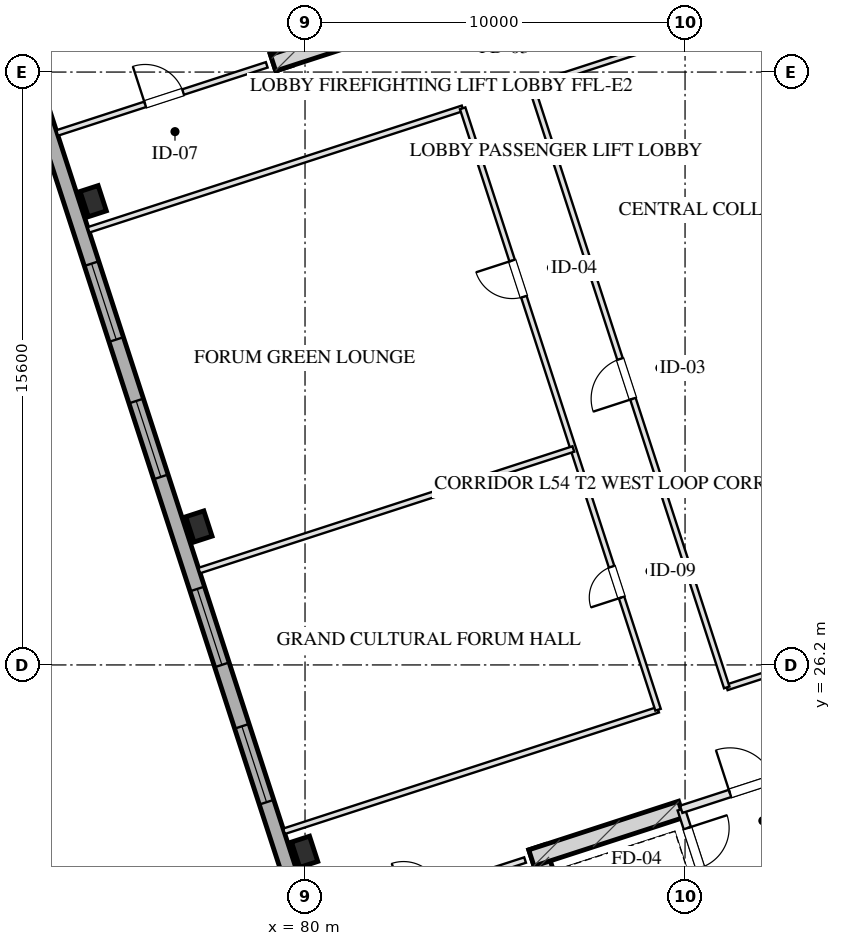
"""IFC4 building model, lengths in metres.
Left out: names, types, materials, properties, quantities, classifications, styles, units other than length and angle.
Written with IfcOpenShell. Run it as: python <this file> out.ifc"""

import sys

from ifc_helpers import new_model, si_unit, direction, frame, frame_2d, origin, origin_2d, place, context, subcontext, project, spatial, rectangle, hollow_rectangle, extrude, element, fill, save


model = new_model("IFC4")
c1 = context("Model", 3, precision=1e-05, world=origin(), true_north=direction((0.0, 1.0)))
c2 = subcontext(c1, "Body", "Model", "MODEL_VIEW")
j1 = project(units=[si_unit("LENGTHUNIT", "METRE"), si_unit("PLANEANGLEUNIT", "RADIAN")], contexts=[c1])
p1 = place(None, origin())
s1 = spatial("IfcSite", under=j1, at=p1, CompositionType="ELEMENT")
p2 = place(p1, origin())
s2 = spatial("IfcBuilding", under=s1, at=p2, CompositionType="ELEMENT")
p3 = place(p2, frame((0.0, 0.0, 202.4)))
s3 = spatial("IfcBuildingStorey", under=s2, at=p3, CompositionType="ELEMENT", Elevation=202.4)
p4 = place(p3, frame((86.102, 21.404, 0.0), z_axis=(0.0, 0.0, 1.0), x_axis=(0.309035778627, -0.951050412717, 0.0)))
e1 = element("IfcWall", 1, at=p4, inside=s3, PredefinedType="SHEAR", context=c2, shape_type="SweptSolid", body=[
    extrude(rectangle(XDim=9.33, YDim=0.45, at=frame_2d((4.665, 0.0))), origin(), (0.0, 0.0, 1.0), 3.45),
])
p5 = place(p3, frame((85.957, 21.12, 0.0), z_axis=(0.0, 0.0, 1.0), x_axis=(0.951064796122, 0.308991510526, 0.0)))
e2 = element("IfcWall", 2, at=p5, inside=s3, PredefinedType="SHEAR", context=c2, shape_type="SweptSolid", body=[
    extrude(rectangle(XDim=4.145, YDim=0.45, at=frame_2d((2.073, 0.0))), origin(), (0.0, 0.0, 1.0), 3.45),
])
p6 = place(p3, frame((79.442, 41.899, 0.0), z_axis=(0.0, 0.0, 1.0), x_axis=(-0.309035778627, 0.951050412717, 0.0)))
e3 = element("IfcWall", 3, at=p6, inside=s3, PredefinedType="SHEAR", context=c2, shape_type="SweptSolid", body=[
    extrude(rectangle(XDim=9.33, YDim=0.45, at=frame_2d((4.665, 0.0))), origin(), (0.0, 0.0, 1.0), 3.45),
])
p7 = place(p3, frame((79.159, 42.043, 0.0), z_axis=(0.0, 0.0, 1.0), x_axis=(0.951047485828, 0.309044785913, 0.0)))
e4 = element("IfcWall", 4, at=p7, inside=s3, PredefinedType="SHEAR", context=c2, shape_type="SweptSolid", body=[
    extrude(rectangle(XDim=4.145, YDim=0.45, at=frame_2d((2.073, 0.0))), origin(), (0.0, 0.0, 1.0), 3.45),
])
for number, where, z_axis, x_axis in (
    (5, (79.99, 21.284, 0.0), (0.0, 0.0, 1.0), (0.951, 0.309, 0.0)),
    (6, (77.208, 29.844, 0.0), (0.0, 0.0, 1.0), (0.951, 0.309, 0.0)),
    (7, (74.427, 38.403, 0.0), (0.0, 0.0, 1.0), (0.951, 0.309, 0.0)),
):
    element("IfcColumn", number, at=place(p3, frame(where, z_axis=z_axis, x_axis=x_axis)), inside=s3, PredefinedType="COLUMN", context=c2, shape_type="SweptSolid", body=[
        extrude(hollow_rectangle(XDim=0.5, YDim=0.7, WallThickness=0.025, at=origin_2d()), origin(), (0.0, 0.0, 1.0), 3.451),
    ])
p8 = place(p3, frame((82.618, 11.414, 0.0), z_axis=(0.0, 0.0, 1.0), x_axis=(-0.309016491071, 0.951056679828, 0.0)))
e8 = element("IfcWall", 8, at=p8, inside=s3, PredefinedType="SOLIDWALL", context=c2, shape_type="SweptSolid", body=[
    extrude(rectangle(XDim=38.4, YDim=0.4, at=frame_2d((19.2, 0.0))), origin(), (0.0, 0.0, 1.0), 2.61),
])
p9 = place(p8, frame((11.75, 0.0, 0.75)))
e9 = element("IfcOpeningElement", 9, at=p9, cuts=e8, PredefinedType="OPENING", context=c2, shape_type="SweptSolid", body=[
    extrude(rectangle(XDim=2.1, YDim=1.46, at=frame_2d((1.05, 0.73))), frame((0.0, 0.21, 0.0), z_axis=(0.0, -1.0, 0.0), x_axis=(1.0, 0.0, 0.0)), (0.0, 0.0, 1.0), 0.42),
])
p10 = place(p8, frame((15.55, 0.0, 0.75)))
e10 = element("IfcOpeningElement", 10, at=p10, cuts=e8, PredefinedType="OPENING", context=c2, shape_type="SweptSolid", body=[
    extrude(rectangle(XDim=2.1, YDim=1.46, at=frame_2d((1.05, 0.73))), frame((0.0, 0.21, 0.0), z_axis=(0.0, -1.0, 0.0), x_axis=(1.0, 0.0, 0.0)), (0.0, 0.0, 1.0), 0.42),
])
p11 = place(p8, frame((20.75, 0.0, 0.75)))
e11 = element("IfcOpeningElement", 11, at=p11, cuts=e8, PredefinedType="OPENING", context=c2, shape_type="SweptSolid", body=[
    extrude(rectangle(XDim=2.1, YDim=1.46, at=frame_2d((1.05, 0.73))), frame((0.0, 0.21, 0.0), z_axis=(0.0, -1.0, 0.0), x_axis=(1.0, 0.0, 0.0)), (0.0, 0.0, 1.0), 0.42),
])
p12 = place(p8, frame((24.55, 0.0, 0.75)))
e12 = element("IfcOpeningElement", 12, at=p12, cuts=e8, PredefinedType="OPENING", context=c2, shape_type="SweptSolid", body=[
    extrude(rectangle(XDim=2.1, YDim=1.46, at=frame_2d((1.05, 0.73))), frame((0.0, 0.21, 0.0), z_axis=(0.0, -1.0, 0.0), x_axis=(1.0, 0.0, 0.0)), (0.0, 0.0, 1.0), 0.42),
])
p13 = place(p3, frame((89.899, 22.401, 0.0), z_axis=(0.0, 0.0, 1.0), x_axis=(0.308932062672, -0.951084108086, 0.0)))
e13 = element("IfcWall", 13, at=p13, inside=s3, PredefinedType="PARTITIONING", context=c2, shape_type="SweptSolid", body=[
    extrude(rectangle(XDim=1.9, YDim=0.2, at=frame_2d((0.95, 0.0))), origin(), (0.0, 0.0, 1.0), 3.175),
])
p14 = place(p13, frame((0.52, 0.0, 0.0)))
e14 = element("IfcOpeningElement", 14, at=p14, cuts=e13, PredefinedType="OPENING", context=c2, shape_type="SweptSolid", body=[
    extrude(rectangle(XDim=1.1, YDim=2.05, at=frame_2d((0.55, 1.025))), frame((0.0, 0.11, 0.0), z_axis=(0.0, -1.0, 0.0), x_axis=(1.0, 0.0, 0.0)), (0.0, 0.0, 1.0), 0.22),
])
p15 = place(p3, frame((89.899, 22.401, 0.0), z_axis=(0.0, 0.0, 1.0), x_axis=(0.951046716504, 0.309047153403, 0.0)))
e15 = element("IfcWall", 15, at=p15, inside=s3, PredefinedType="PARTITIONING", context=c2, shape_type="SweptSolid", body=[
    extrude(rectangle(XDim=3.83, YDim=0.2, at=frame_2d((1.915, 0.0))), origin(), (0.0, 0.0, 1.0), 3.175),
])
p16 = place(p15, frame((1.35, 0.0, 0.0)))
e16 = element("IfcOpeningElement", 16, at=p16, cuts=e15, PredefinedType="OPENING", context=c2, shape_type="SweptSolid", body=[
    extrude(rectangle(XDim=1.2, YDim=2.05, at=frame_2d((0.6, 1.025))), frame((0.0, 0.11, 0.0), z_axis=(0.0, -1.0, 0.0), x_axis=(1.0, 0.0, 0.0)), (0.0, 0.0, 1.0), 0.22),
])
p17 = place(p3, frame((80.275, 19.274, 0.0), z_axis=(0.0, 0.0, 1.0), x_axis=(0.951059431056, 0.309008023519, 0.0)))
e17 = element("IfcWall", 17, at=p17, inside=s3, PredefinedType="PARTITIONING", context=c2, shape_type="SweptSolid", body=[
    extrude(rectangle(XDim=5.8, YDim=0.15, at=frame_2d((2.9, 0.0))), origin(), (0.0, 0.0, 1.0), 3.175),
])
p18 = place(p17, frame((2.436, 0.0, 0.0)))
e18 = element("IfcOpeningElement", 18, at=p18, cuts=e17, PredefinedType="OPENING", context=c2, shape_type="SweptSolid", body=[
    extrude(rectangle(XDim=1.0, YDim=2.05, at=frame_2d((0.5, 1.025))), frame((0.0, 0.085, 0.0), z_axis=(0.0, -1.0, 0.0), x_axis=(1.0, 0.0, 0.0)), (0.0, 0.0, 1.0), 0.17),
])
p19 = place(p3, frame((73.476, 40.197, 0.0), z_axis=(0.0, 0.0, 1.0), x_axis=(0.951059431056, 0.309008023519, 0.0)))
e19 = element("IfcWall", 19, at=p19, inside=s3, PredefinedType="PARTITIONING", context=c2, shape_type="SweptSolid", body=[
    extrude(rectangle(XDim=5.8, YDim=0.15, at=frame_2d((2.9, 0.0))), origin(), (0.0, 0.0, 1.0), 3.175),
])
p20 = place(p19, frame((2.436, 0.0, 0.0)))
e20 = element("IfcOpeningElement", 20, at=p20, cuts=e19, PredefinedType="OPENING", context=c2, shape_type="SweptSolid", body=[
    extrude(rectangle(XDim=1.05, YDim=2.05, at=frame_2d((0.525, 1.025))), frame((0.0, 0.085, 0.0), z_axis=(0.0, -1.0, 0.0), x_axis=(1.0, 0.0, 0.0)), (0.0, 0.0, 1.0), 0.17),
])
p21 = place(p3, frame((79.447, 21.823, 0.0), z_axis=(0.0, 0.0, 1.0), x_axis=(0.951057294912, 0.309014598029, 0.0)))
e21 = element("IfcWall", 21, at=p21, inside=s3, PredefinedType="PARTITIONING", context=c2, shape_type="SweptSolid", body=[
    extrude(rectangle(XDim=10.35, YDim=0.15, at=frame_2d((5.175, 0.0))), origin(), (0.0, 0.0, 1.0), 3.175),
])
p22 = place(p3, frame((91.097, 25.608, 0.0), z_axis=(0.0, 0.0, 1.0), x_axis=(0.951053063704, 0.309027620156, 0.0)))
e22 = element("IfcWall", 22, at=p22, inside=s3, PredefinedType="PARTITIONING", context=c2, shape_type="SweptSolid", body=[
    extrude(rectangle(XDim=9.35, YDim=0.15, at=frame_2d((4.675, 0.0))), origin(), (0.0, 0.0, 1.0), 3.175),
])
p23 = place(p3, frame((74.304, 37.648, 0.0), z_axis=(0.0, 0.0, 1.0), x_axis=(0.951059547341, 0.309007665621, 0.0)))
e23 = element("IfcWall", 23, at=p23, inside=s3, PredefinedType="PARTITIONING", context=c2, shape_type="SweptSolid", body=[
    extrude(rectangle(XDim=10.35, YDim=0.15, at=frame_2d((5.175, 0.0))), origin(), (0.0, 0.0, 1.0), 3.175),
])
p24 = place(p3, frame((85.955, 41.434, 0.0), z_axis=(0.0, 0.0, 1.0), x_axis=(0.951053063704, 0.309027620156, 0.0)))
e24 = element("IfcWall", 24, at=p24, inside=s3, PredefinedType="PARTITIONING", context=c2, shape_type="SweptSolid", body=[
    extrude(rectangle(XDim=9.35, YDim=0.15, at=frame_2d((4.675, 0.0))), origin(), (0.0, 0.0, 1.0), 3.175),
])
p25 = place(p3, frame((89.29, 25.021, 0.0), z_axis=(0.0, 0.0, 1.0), x_axis=(-0.309004459387, 0.951060589068, 0.0)))
e25 = element("IfcWall", 25, at=p25, inside=s3, PredefinedType="PARTITIONING", context=c2, shape_type="SweptSolid", body=[
    extrude(rectangle(XDim=16.64, YDim=0.15, at=frame_2d((8.32, 0.0))), origin(), (0.0, 0.0, 1.0), 3.175),
])
p26 = place(p25, frame((3.107, 0.0, 0.0)))
e26 = element("IfcOpeningElement", 26, at=p26, cuts=e25, PredefinedType="OPENING", context=c2, shape_type="SweptSolid", body=[
    extrude(rectangle(XDim=0.85, YDim=2.05, at=frame_2d((0.425, 1.025))), frame((0.0, 0.085, 0.0), z_axis=(0.0, -1.0, 0.0), x_axis=(1.0, 0.0, 0.0)), (0.0, 0.0, 1.0), 0.17),
])
p27 = place(p25, frame((11.427, 0.0, 0.0)))
e27 = element("IfcOpeningElement", 27, at=p27, cuts=e25, PredefinedType="OPENING", context=c2, shape_type="SweptSolid", body=[
    extrude(rectangle(XDim=1.0, YDim=2.05, at=frame_2d((0.5, 1.025))), frame((0.0, 0.085, 0.0), z_axis=(0.0, -1.0, 0.0), x_axis=(1.0, 0.0, 0.0)), (0.0, 0.0, 1.0), 0.17),
])
p28 = place(p3, frame((91.097, 25.608, 0.0), z_axis=(0.0, 0.0, 1.0), x_axis=(-0.30901773025, 0.951056277195, 0.0)))
e28 = element("IfcWall", 28, at=p28, inside=s3, PredefinedType="PARTITIONING", context=c2, shape_type="SweptSolid", body=[
    extrude(rectangle(XDim=16.64, YDim=0.15, at=frame_2d((8.32, 0.0))), origin(), (0.0, 0.0, 1.0), 3.175),
])
p29 = place(p28, frame((7.987, 0.0, 0.0)))
e29 = element("IfcOpeningElement", 29, at=p29, cuts=e28, PredefinedType="OPENING", context=c2, shape_type="SweptSolid", body=[
    extrude(rectangle(XDim=1.1, YDim=2.05, at=frame_2d((0.55, 1.025))), frame((0.0, 0.085, 0.0), z_axis=(0.0, -1.0, 0.0), x_axis=(1.0, 0.0, 0.0)), (0.0, 0.0, 1.0), 0.17),
])
p30 = place(p3, frame((77.217, 28.684, 0.0), z_axis=(0.0, 0.0, 1.0), x_axis=(0.951059547341, 0.309007665621, 0.0)))
e30 = element("IfcWall", 30, at=p30, inside=s3, PredefinedType="PARTITIONING", context=c2, shape_type="SweptSolid", body=[
    extrude(rectangle(XDim=10.35, YDim=0.15, at=frame_2d((5.175, 0.0))), origin(), (0.0, 0.0, 1.0), 3.175),
])
p31 = place(p9, origin())
e31 = element("IfcWindow", 31, at=p31, inside=s3, PartitioningType="TRIPLE_PANEL_VERTICAL", PredefinedType="WINDOW", context=c2, shape_type="SweptSolid", body=[
    extrude(rectangle(XDim=2.1, YDim=1.46, at=frame_2d((1.05, 0.73))), frame((0.0, 0.03, 0.0), z_axis=(0.0, -1.0, 0.0), x_axis=(1.0, 0.0, 0.0)), (0.0, 0.0, 1.0), 0.06),
])
fill(e9, e31)
p32 = place(p10, origin())
e32 = element("IfcWindow", 32, at=p32, inside=s3, PartitioningType="TRIPLE_PANEL_VERTICAL", PredefinedType="WINDOW", context=c2, shape_type="SweptSolid", body=[
    extrude(rectangle(XDim=2.1, YDim=1.46, at=frame_2d((1.05, 0.73))), frame((0.0, 0.03, 0.0), z_axis=(0.0, -1.0, 0.0), x_axis=(1.0, 0.0, 0.0)), (0.0, 0.0, 1.0), 0.06),
])
fill(e10, e32)
p33 = place(p11, origin())
e33 = element("IfcWindow", 33, at=p33, inside=s3, PartitioningType="TRIPLE_PANEL_VERTICAL", PredefinedType="WINDOW", context=c2, shape_type="SweptSolid", body=[
    extrude(rectangle(XDim=2.1, YDim=1.46, at=frame_2d((1.05, 0.73))), frame((0.0, 0.03, 0.0), z_axis=(0.0, -1.0, 0.0), x_axis=(1.0, 0.0, 0.0)), (0.0, 0.0, 1.0), 0.06),
])
fill(e11, e33)
p34 = place(p12, origin())
e34 = element("IfcWindow", 34, at=p34, inside=s3, PartitioningType="TRIPLE_PANEL_VERTICAL", PredefinedType="WINDOW", context=c2, shape_type="SweptSolid", body=[
    extrude(rectangle(XDim=2.1, YDim=1.46, at=frame_2d((1.05, 0.73))), frame((0.0, 0.03, 0.0), z_axis=(0.0, -1.0, 0.0), x_axis=(1.0, 0.0, 0.0)), (0.0, 0.0, 1.0), 0.06),
])
fill(e12, e34)
p35 = place(p14, origin())
e35 = element("IfcDoor", 35, at=p35, inside=s3, OperationType="SINGLE_SWING_LEFT", PredefinedType="DOOR", context=c2, shape_type="SweptSolid", body=[
    extrude(rectangle(XDim=1.1, YDim=2.05, at=frame_2d((0.55, 1.025))), frame((0.0, 0.025, 0.0), z_axis=(0.0, -1.0, 0.0), x_axis=(1.0, 0.0, 0.0)), (0.0, 0.0, 1.0), 0.05),
])
fill(e14, e35)
p36 = place(p16, origin())
e36 = element("IfcDoor", 36, at=p36, inside=s3, OperationType="SINGLE_SWING_LEFT", PredefinedType="DOOR", context=c2, shape_type="SweptSolid", body=[
    extrude(rectangle(XDim=1.2, YDim=2.05, at=frame_2d((0.6, 1.025))), frame((0.0, 0.025, 0.0), z_axis=(0.0, -1.0, 0.0), x_axis=(1.0, 0.0, 0.0)), (0.0, 0.0, 1.0), 0.05),
])
fill(e16, e36)
p37 = place(p20, origin())
e37 = element("IfcDoor", 37, at=p37, inside=s3, OperationType="SINGLE_SWING_LEFT", PredefinedType="DOOR", context=c2, shape_type="SweptSolid", body=[
    extrude(rectangle(XDim=1.05, YDim=2.05, at=frame_2d((0.525, 1.025))), frame((0.0, 0.025, 0.0), z_axis=(0.0, -1.0, 0.0), x_axis=(1.0, 0.0, 0.0)), (0.0, 0.0, 1.0), 0.05),
])
fill(e20, e37)
p38 = place(p26, origin())
e38 = element("IfcDoor", 38, at=p38, inside=s3, OperationType="SINGLE_SWING_LEFT", PredefinedType="DOOR", context=c2, shape_type="SweptSolid", body=[
    extrude(rectangle(XDim=0.85, YDim=2.05, at=frame_2d((0.425, 1.025))), frame((0.0, 0.025, 0.0), z_axis=(0.0, -1.0, 0.0), x_axis=(1.0, 0.0, 0.0)), (0.0, 0.0, 1.0), 0.05),
])
fill(e26, e38)
p39 = place(p27, origin())
e39 = element("IfcDoor", 39, at=p39, inside=s3, OperationType="SINGLE_SWING_RIGHT", PredefinedType="DOOR", context=c2, shape_type="SweptSolid", body=[
    extrude(rectangle(XDim=1.0, YDim=2.05, at=frame_2d((0.5, 1.025))), frame((0.0, 0.025, 0.0), z_axis=(0.0, -1.0, 0.0), x_axis=(1.0, 0.0, 0.0)), (0.0, 0.0, 1.0), 0.05),
])
fill(e27, e39)
p40 = place(p29, origin())
e40 = element("IfcDoor", 40, at=p40, inside=s3, OperationType="SINGLE_SWING_LEFT", PredefinedType="DOOR", context=c2, shape_type="SweptSolid", body=[
    extrude(rectangle(XDim=1.1, YDim=2.05, at=frame_2d((0.55, 1.025))), frame((0.0, 0.025, 0.0), z_axis=(0.0, -1.0, 0.0), x_axis=(1.0, 0.0, 0.0)), (0.0, 0.0, 1.0), 0.05),
])
fill(e29, e40)
save(model, sys.argv[1])
